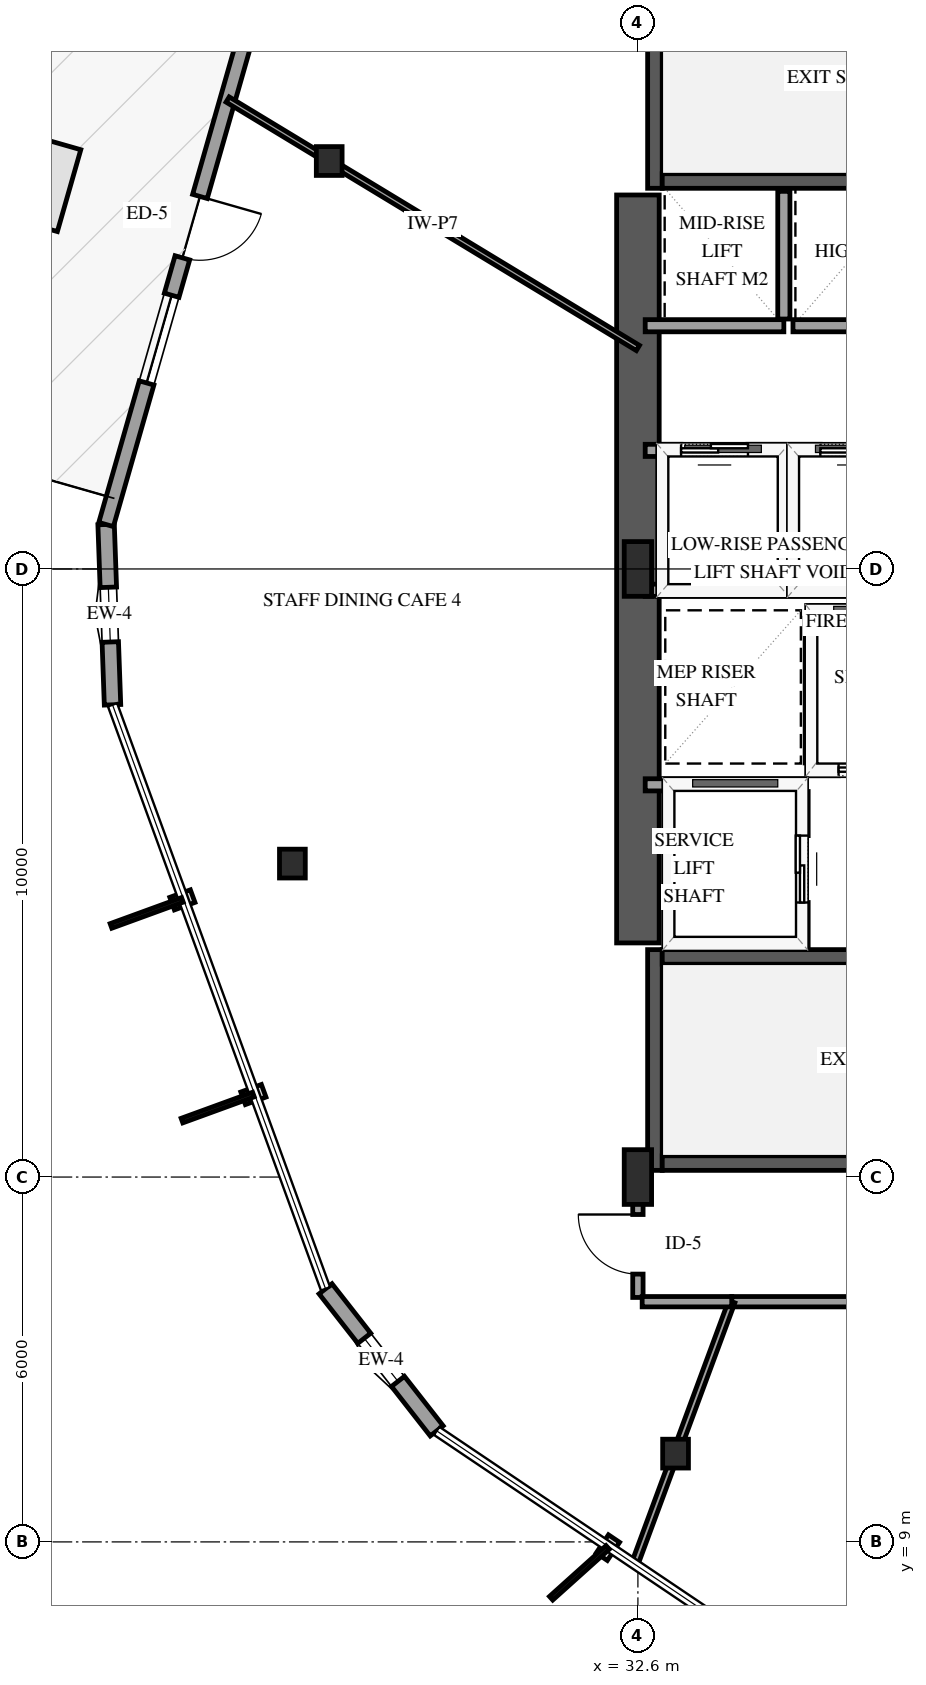
"""IFC4 building model, lengths in metres.
Left out: names, types, materials, properties, quantities, classifications, styles, units other than length and angle.
Written with IfcOpenShell. Run it as: python <this file> out.ifc"""

import sys

from ifc_helpers import new_model, si_unit, direction, frame, frame_2d, origin, origin_2d, place, context, subcontext, project, spatial, rectangle, i_section, extrude, element, fill, save


model = new_model("IFC4")
c1 = context("Model", 3, precision=1e-05, world=origin(), true_north=direction((0.0, 1.0)))
c2 = subcontext(c1, "Body", "Model", "MODEL_VIEW")
j1 = project(units=[si_unit("LENGTHUNIT", "METRE"), si_unit("PLANEANGLEUNIT", "RADIAN")], contexts=[c1])
p1 = place(None, origin())
s1 = spatial("IfcSite", under=j1, at=p1, CompositionType="ELEMENT")
p2 = place(p1, origin())
s2 = spatial("IfcBuilding", under=s1, at=p2, CompositionType="ELEMENT")
p3 = place(p2, frame((0.0, 0.0, 34.6)))
s3 = spatial("IfcBuildingStorey", under=s2, at=p3, CompositionType="ELEMENT", Elevation=34.6)
p4 = place(p3, frame((32.88, 15.11, 0.0), z_axis=(0.0, 0.0, 1.0), x_axis=(0.0, 1.0, 0.0)))
e1 = element("IfcWall", 1, at=p4, inside=s3, PredefinedType="SHEAR", context=c2, shape_type="SweptSolid", body=[
    extrude(rectangle(XDim=3.63, YDim=0.24, at=frame_2d((1.815, 0.0))), origin(), (0.0, 0.0, 1.0), 4.0),
])
for number, where, z_axis, x_axis in (
    (2, (33.0, 15.23, 0.0), (0.0, 0.0, 1.0), (1.0, 0.0, 0.0)),
    (3, (33.0, 18.62, 0.0), (0.0, 0.0, 1.0), (1.0, 0.0, 0.0)),
):
    element("IfcWall", number, at=place(p3, frame(where, z_axis=z_axis, x_axis=x_axis)), inside=s3, PredefinedType="SHEAR", context=c2, shape_type="SweptSolid", body=[
        extrude(rectangle(XDim=8.0, YDim=0.24, at=frame_2d((4.0, 0.0))), origin(), (0.0, 0.0, 1.0), 4.0),
    ])
p5 = place(p3, frame((32.88, 31.26, 0.0), z_axis=(0.0, 0.0, 1.0), x_axis=(0.0, 1.0, 0.0)))
e4 = element("IfcWall", 4, at=p5, inside=s3, PredefinedType="SHEAR", context=c2, shape_type="SweptSolid", body=[
    extrude(rectangle(XDim=3.63, YDim=0.24, at=frame_2d((1.815, 0.0))), origin(), (0.0, 0.0, 1.0), 4.0),
])
p6 = place(p3, frame((33.0, 31.38, 0.0), z_axis=(0.0, 0.0, 1.0), x_axis=(1.0, 0.0, 0.0)))
e5 = element("IfcWall", 5, at=p6, inside=s3, PredefinedType="SHEAR", context=c2, shape_type="SweptSolid", body=[
    extrude(rectangle(XDim=8.0, YDim=0.24, at=frame_2d((4.0, 0.0))), origin(), (0.0, 0.0, 1.0), 4.0),
])
p7 = place(p3, frame((32.6, 18.85, 0.0), z_axis=(0.0, 0.0, 1.0), x_axis=(0.0, 1.0, 0.0)))
e6 = element("IfcWall", 6, at=p7, inside=s3, PredefinedType="SHEAR", context=c2, shape_type="SweptSolid", body=[
    extrude(rectangle(XDim=12.3, YDim=0.7, at=frame_2d((6.15, 0.0))), origin(), (0.0, 0.0, 1.0), 4.0),
])
for number, where, z_axis, x_axis in (
    (7, (32.6, 15.0, 0.0), (0.0, 0.0, 1.0), (1.0, 0.0, 0.0)),
    (8, (32.6, 25.0, 0.0), (0.0, 0.0, 1.0), (1.0, 0.0, 0.0)),
):
    element("IfcColumn", number, at=place(p3, frame(where, z_axis=z_axis, x_axis=x_axis)), inside=s3, PredefinedType="PILASTER", context=c2, shape_type="SweptSolid", body=[
        extrude(rectangle(XDim=0.45, YDim=0.9, at=origin_2d()), origin(), (0.0, 0.0, 1.0), 4.0),
    ])
for number, where, z_axis, x_axis in (
    (9, (27.523, 31.708, 0.0), (0.0, 0.0, 1.0), (1.0, 0.0, 0.0)),
    (10, (26.918, 20.155, 0.0), (0.0, 0.0, 1.0), (1.0, 0.0, 0.0)),
    (11, (33.219, 10.452, 0.0), (0.0, 0.0, 1.0), (1.0, 0.0, 0.0)),
):
    element("IfcColumn", number, at=place(p3, frame(where, z_axis=z_axis, x_axis=x_axis)), inside=s3, PredefinedType="COLUMN", context=c2, shape_type="SweptSolid", body=[
        extrude(i_section(OverallWidth=0.424, OverallDepth=0.474, WebThickness=0.048, FlangeThickness=0.077, FilletRadius=0.038, at=origin_2d()), origin(), (0.0, 0.0, 1.0), 4.0),
    ])
p8 = place(p3, frame((23.854, 25.731, 0.0), z_axis=(0.0, 0.0, 1.0), x_axis=(0.035635755397, -0.999364844758, 0.0)))
e12 = element("IfcWall", 12, at=p8, inside=s3, PredefinedType="SOLIDWALL", context=c2, shape_type="SweptSolid", body=[
    extrude(rectangle(XDim=2.967, YDim=0.27, at=frame_2d((1.483, 0.0))), origin(), (0.0, 0.0, 1.0), 3.079),
])
p9 = place(p8, frame((1.033, 0.0, 0.75)))
e13 = element("IfcOpeningElement", 13, at=p9, cuts=e12, PredefinedType="OPENING", context=c2, shape_type="SweptSolid", body=[
    extrude(rectangle(XDim=0.9, YDim=1.5, at=frame_2d((0.45, 0.75))), frame((0.0, 0.145, 0.0), z_axis=(0.0, -1.0, 0.0), x_axis=(1.0, 0.0, 0.0)), (0.0, 0.0, 1.0), 0.29),
])
p10 = place(p3, frame((26.665, 35.56, 0.0), z_axis=(0.0, 0.0, 1.0), x_axis=(-0.274967139431, -0.961453624588, 0.0)))
e14 = element("IfcWall", 14, at=p10, inside=s3, PredefinedType="SOLIDWALL", context=c2, shape_type="SweptSolid", body=[
    extrude(rectangle(XDim=10.223, YDim=0.25, at=frame_2d((5.112, 0.0))), origin(), (0.0, 0.0, 1.0), 3.079),
])
p11 = place(p10, frame((4.612, 0.0, 0.0)))
e15 = element("IfcOpeningElement", 15, at=p11, cuts=e14, PredefinedType="OPENING", context=c2, shape_type="SweptSolid", body=[
    extrude(rectangle(XDim=1.05, YDim=2.15, at=frame_2d((0.525, 1.075))), frame((0.0, 0.135, 0.0), z_axis=(0.0, -1.0, 0.0), x_axis=(1.0, 0.0, 0.0)), (0.0, 0.0, 1.0), 0.27),
])
p12 = place(p10, frame((0.44, 0.0, 0.72)))
e16 = element("IfcOpeningElement", 16, at=p12, cuts=e14, PredefinedType="OPENING", context=c2, shape_type="SweptSolid", body=[
    extrude(rectangle(XDim=1.5, YDim=1.7, at=frame_2d((0.75, 0.85))), frame((0.0, 0.135, 0.0), z_axis=(0.0, -1.0, 0.0), x_axis=(1.0, 0.0, 0.0)), (0.0, 0.0, 1.0), 0.27),
])
p13 = place(p10, frame((6.302, 0.0, 0.72)))
e17 = element("IfcOpeningElement", 17, at=p13, cuts=e14, PredefinedType="OPENING", context=c2, shape_type="SweptSolid", body=[
    extrude(rectangle(XDim=1.5, YDim=1.7, at=frame_2d((0.75, 0.85))), frame((0.0, 0.135, 0.0), z_axis=(0.0, -1.0, 0.0), x_axis=(1.0, 0.0, 0.0)), (0.0, 0.0, 1.0), 0.27),
])
p14 = place(p3, frame((27.463, 13.162, 0.0), z_axis=(0.0, 0.0, 1.0), x_axis=(0.616177326297, -0.78760745461, 0.0)))
e18 = element("IfcWall", 18, at=p14, inside=s3, PredefinedType="SOLIDWALL", context=c2, shape_type="SweptSolid", body=[
    extrude(rectangle(XDim=2.967, YDim=0.27, at=frame_2d((1.483, 0.0))), origin(), (0.0, 0.0, 1.0), 3.079),
])
p15 = place(p14, frame((1.033, 0.0, 0.75)))
e19 = element("IfcOpeningElement", 19, at=p15, cuts=e18, PredefinedType="OPENING", context=c2, shape_type="SweptSolid", body=[
    extrude(rectangle(XDim=0.9, YDim=1.5, at=frame_2d((0.45, 0.75))), frame((0.0, 0.145, 0.0), z_axis=(0.0, -1.0, 0.0), x_axis=(1.0, 0.0, 0.0)), (0.0, 0.0, 1.0), 0.29),
])
p16 = place(p3, frame((35.45, 21.7, 0.0), z_axis=(0.0, 0.0, 1.0), x_axis=(1.0, 0.0, 0.0)))
e20 = element("IfcWall", 20, at=p16, inside=s3, PredefinedType="SOLIDWALL", context=c2, shape_type="SweptSolid", body=[
    extrude(rectangle(XDim=2.0, YDim=0.2, at=frame_2d((1.0, 0.0))), origin(), (0.0, 0.0, 1.0), 3.7),
])
p17 = place(p16, frame((0.45, 0.0, 0.0)))
e21 = element("IfcOpeningElement", 21, at=p17, cuts=e20, PredefinedType="OPENING", context=c2, shape_type="SweptSolid", body=[
    extrude(rectangle(XDim=1.1, YDim=2.15, at=frame_2d((0.55, 1.075))), frame((0.0, 0.11, 0.0), z_axis=(0.0, -1.0, 0.0), x_axis=(1.0, 0.0, 0.0)), (0.0, 0.0, 1.0), 0.22),
])
p18 = place(p3, frame((35.45, 24.3, 0.0), z_axis=(0.0, 0.0, 1.0), x_axis=(1.0, 0.0, 0.0)))
e22 = element("IfcWall", 22, at=p18, inside=s3, PredefinedType="SOLIDWALL", context=c2, shape_type="SweptSolid", body=[
    extrude(rectangle(XDim=2.0, YDim=0.2, at=frame_2d((1.0, 0.0))), origin(), (0.0, 0.0, 1.0), 3.7),
])
p19 = place(p3, frame((35.45, 21.81, 0.0), z_axis=(0.0, 0.0, 1.0), x_axis=(0.0, 1.0, 0.0)))
e23 = element("IfcWall", 23, at=p19, inside=s3, PredefinedType="SOLIDWALL", context=c2, shape_type="SweptSolid", body=[
    extrude(rectangle(XDim=2.38, YDim=0.2, at=frame_2d((1.19, 0.0))), origin(), (0.0, 0.0, 1.0), 3.7),
])
p20 = place(p3, frame((32.72, 21.45, 0.0), z_axis=(0.0, 0.0, 1.0), x_axis=(1.0, 0.0, 0.0)))
e24 = element("IfcWall", 24, at=p20, inside=s3, PredefinedType="SOLIDWALL", context=c2, shape_type="SweptSolid", body=[
    extrude(rectangle(XDim=2.58, YDim=0.2, at=frame_2d((1.29, 0.0))), origin(), (0.0, 0.0, 1.0), 3.7),
])
p21 = place(p3, frame((35.3, 18.79, 0.0), z_axis=(0.0, 0.0, 1.0), x_axis=(0.0, 1.0, 0.0)))
e25 = element("IfcWall", 25, at=p21, inside=s3, PredefinedType="SOLIDWALL", context=c2, shape_type="SweptSolid", body=[
    extrude(rectangle(XDim=2.55, YDim=0.2, at=frame_2d((1.275, 0.0))), origin(), (0.0, 0.0, 1.0), 3.7),
])
p22 = place(p21, frame((0.725, 0.0, 0.0)))
e26 = element("IfcOpeningElement", 26, at=p22, cuts=e25, PredefinedType="OPENING", context=c2, shape_type="SweptSolid", body=[
    extrude(rectangle(XDim=1.1, YDim=2.15, at=frame_2d((0.55, 1.075))), frame((0.0, 0.11, 0.0), z_axis=(0.0, -1.0, 0.0), x_axis=(1.0, 0.0, 0.0)), (0.0, 0.0, 1.0), 0.22),
])
p23 = place(p3, frame((32.72, 24.65, 0.0), z_axis=(0.0, 0.0, 1.0), x_axis=(1.0, 0.0, 0.0)))
e27 = element("IfcWall", 27, at=p23, inside=s3, PredefinedType="SOLIDWALL", context=c2, shape_type="SweptSolid", body=[
    extrude(rectangle(XDim=2.28, YDim=0.2, at=frame_2d((1.14, 0.0))), origin(), (0.0, 0.0, 1.0), 3.7),
])
p24 = place(p3, frame((32.72, 26.95, 0.0), z_axis=(0.0, 0.0, 1.0), x_axis=(1.0, 0.0, 0.0)))
e28 = element("IfcWall", 28, at=p24, inside=s3, PredefinedType="SOLIDWALL", context=c2, shape_type="SweptSolid", body=[
    extrude(rectangle(XDim=2.28, YDim=0.2, at=frame_2d((1.14, 0.0))), origin(), (0.0, 0.0, 1.0), 3.7),
])
p25 = place(p24, frame((0.59, 0.0, 0.0)))
e29 = element("IfcOpeningElement", 29, at=p25, cuts=e28, PredefinedType="OPENING", context=c2, shape_type="SweptSolid", body=[
    extrude(rectangle(XDim=1.1, YDim=2.15, at=frame_2d((0.55, 1.075))), frame((0.0, 0.11, 0.0), z_axis=(0.0, -1.0, 0.0), x_axis=(1.0, 0.0, 0.0)), (0.0, 0.0, 1.0), 0.22),
])
p26 = place(p3, frame((35.0, 24.76, 0.0), z_axis=(0.0, 0.0, 1.0), x_axis=(0.0, 1.0, 0.0)))
e30 = element("IfcWall", 30, at=p26, inside=s3, PredefinedType="SOLIDWALL", context=c2, shape_type="SweptSolid", body=[
    extrude(rectangle(XDim=2.08, YDim=0.2, at=frame_2d((1.04, 0.0))), origin(), (0.0, 0.0, 1.0), 3.7),
])
p27 = place(p3, frame((35.15, 24.65, 0.0), z_axis=(0.0, 0.0, 1.0), x_axis=(1.0, 0.0, 0.0)))
e31 = element("IfcWall", 31, at=p27, inside=s3, PredefinedType="SOLIDWALL", context=c2, shape_type="SweptSolid", body=[
    extrude(rectangle(XDim=2.0, YDim=0.2, at=frame_2d((1.0, 0.0))), origin(), (0.0, 0.0, 1.0), 3.7),
])
p28 = place(p3, frame((35.15, 26.95, 0.0), z_axis=(0.0, 0.0, 1.0), x_axis=(1.0, 0.0, 0.0)))
e32 = element("IfcWall", 32, at=p28, inside=s3, PredefinedType="SOLIDWALL", context=c2, shape_type="SweptSolid", body=[
    extrude(rectangle(XDim=2.0, YDim=0.2, at=frame_2d((1.0, 0.0))), origin(), (0.0, 0.0, 1.0), 3.7),
])
p29 = place(p28, frame((0.45, 0.0, 0.0)))
e33 = element("IfcOpeningElement", 33, at=p29, cuts=e32, PredefinedType="OPENING", context=c2, shape_type="SweptSolid", body=[
    extrude(rectangle(XDim=1.1, YDim=2.15, at=frame_2d((0.55, 1.075))), frame((0.0, 0.11, 0.0), z_axis=(0.0, -1.0, 0.0), x_axis=(1.0, 0.0, 0.0)), (0.0, 0.0, 1.0), 0.22),
])
p30 = place(p3, frame((32.72, 29.0, 0.0), z_axis=(0.0, 0.0, 1.0), x_axis=(1.0, 0.0, 0.0)))
e34 = element("IfcWall", 34, at=p30, inside=s3, PredefinedType="SOLIDWALL", context=c2, shape_type="SweptSolid", body=[
    extrude(rectangle(XDim=2.28, YDim=0.2, at=frame_2d((1.14, 0.0))), origin(), (0.0, 0.0, 1.0), 3.7),
])
p31 = place(p3, frame((35.0, 29.11, 0.0), z_axis=(0.0, 0.0, 1.0), x_axis=(0.0, 1.0, 0.0)))
e35 = element("IfcWall", 35, at=p31, inside=s3, PredefinedType="SOLIDWALL", context=c2, shape_type="SweptSolid", body=[
    extrude(rectangle(XDim=2.1, YDim=0.2, at=frame_2d((1.05, 0.0))), origin(), (0.0, 0.0, 1.0), 3.7),
])
p32 = place(p3, frame((35.15, 29.0, 0.0), z_axis=(0.0, 0.0, 1.0), x_axis=(1.0, 0.0, 0.0)))
e36 = element("IfcWall", 36, at=p32, inside=s3, PredefinedType="SOLIDWALL", context=c2, shape_type="SweptSolid", body=[
    extrude(rectangle(XDim=2.0, YDim=0.2, at=frame_2d((1.0, 0.0))), origin(), (0.0, 0.0, 1.0), 3.7),
])
p33 = place(p3, frame((42.094, 12.95, 0.0), z_axis=(0.0, 0.0, 1.0), x_axis=(-1.0, 0.0, 0.0)))
e37 = element("IfcWall", 37, at=p33, inside=s3, PredefinedType="PARTITIONING", context=c2, shape_type="SweptSolid", body=[
    extrude(rectangle(XDim=7.951, YDim=0.17, at=frame_2d((3.976, 0.0))), origin(), (0.0, 0.0, 1.0), 3.7),
])
p34 = place(p33, frame((3.501, 0.0, 0.0)))
e38 = element("IfcOpeningElement", 38, at=p34, cuts=e37, PredefinedType="OPENING", context=c2, shape_type="SweptSolid", body=[
    extrude(rectangle(XDim=0.98, YDim=2.15, at=frame_2d((0.49, 1.075))), frame((0.0, 0.095, 0.0), z_axis=(0.0, -1.0, 0.0), x_axis=(1.0, 0.0, 0.0)), (0.0, 0.0, 1.0), 0.19),
])
p35 = place(p3, frame((32.6, 28.634, 0.0), z_axis=(0.0, 0.0, 1.0), x_axis=(-0.855377378264, 0.518005348191, 0.0)))
e39 = element("IfcWall", 39, at=p35, inside=s3, PredefinedType="PARTITIONING", context=c2, shape_type="SweptSolid", body=[
    extrude(rectangle(XDim=7.888, YDim=0.1, at=frame_2d((3.944, 0.0))), origin(), (0.0, 0.0, 1.0), 3.074),
])
p36 = place(p3, frame((34.143, 12.95, 0.0), z_axis=(0.0, 0.0, 1.0), x_axis=(-0.347062077262, -0.937842158642, 0.0)))
e40 = element("IfcWall", 40, at=p36, inside=s3, PredefinedType="PARTITIONING", context=c2, shape_type="SweptSolid", body=[
    extrude(rectangle(XDim=4.602, YDim=0.11, at=frame_2d((2.301, 0.0))), origin(), (0.0, 0.0, 1.0), 2.995),
])
p37 = place(p3, frame((32.6, 13.02, 0.0), z_axis=(0.0, 0.0, 1.0), x_axis=(0.0, 1.0, 0.0)))
e41 = element("IfcWall", 41, at=p37, inside=s3, PredefinedType="PARTITIONING", context=c2, shape_type="SweptSolid", body=[
    extrude(rectangle(XDim=1.91, YDim=0.17, at=frame_2d((0.955, 0.0))), origin(), (0.0, 0.0, 1.0), 3.7),
])
p38 = place(p37, frame((0.384, 0.0, 0.0)))
e42 = element("IfcOpeningElement", 42, at=p38, cuts=e41, PredefinedType="OPENING", context=c2, shape_type="SweptSolid", body=[
    extrude(rectangle(XDim=0.98, YDim=2.15, at=frame_2d((0.49, 1.075))), frame((0.0, 0.095, 0.0), z_axis=(0.0, -1.0, 0.0), x_axis=(1.0, 0.0, 0.0)), (0.0, 0.0, 1.0), 0.19),
])
p39 = place(p3, frame((34.143, 12.95, 0.0), z_axis=(0.0, 0.0, 1.0), x_axis=(-1.0, 0.0, 0.0)))
e43 = element("IfcWall", 43, at=p39, inside=s3, PredefinedType="PARTITIONING", context=c2, shape_type="SweptSolid", body=[
    extrude(rectangle(XDim=1.473, YDim=0.17, at=frame_2d((0.737, 0.0))), origin(), (0.0, 0.0, 1.0), 3.7),
])
p40 = place(p9, origin())
e44 = element("IfcWindow", 44, at=p40, inside=s3, PartitioningType="SINGLE_PANEL", PredefinedType="WINDOW", context=c2, shape_type="SweptSolid", body=[
    extrude(rectangle(XDim=0.9, YDim=1.5, at=frame_2d((0.45, 0.75))), frame((0.0, 0.03, 0.0), z_axis=(0.0, -1.0, 0.0), x_axis=(1.0, 0.0, 0.0)), (0.0, 0.0, 1.0), 0.06),
])
fill(e13, e44)
p41 = place(p11, origin())
e45 = element("IfcDoor", 45, at=p41, inside=s3, OperationType="SINGLE_SWING_LEFT", PredefinedType="DOOR", context=c2, shape_type="SweptSolid", body=[
    extrude(rectangle(XDim=1.05, YDim=2.15, at=frame_2d((0.525, 1.075))), frame((0.0, 0.025, 0.0), z_axis=(0.0, -1.0, 0.0), x_axis=(1.0, 0.0, 0.0)), (0.0, 0.0, 1.0), 0.05),
])
fill(e15, e45)
p42 = place(p13, origin())
e46 = element("IfcWindow", 46, at=p42, inside=s3, PartitioningType="SINGLE_PANEL", PredefinedType="WINDOW", context=c2, shape_type="SweptSolid", body=[
    extrude(rectangle(XDim=1.5, YDim=1.7, at=frame_2d((0.75, 0.85))), frame((0.0, 0.03, 0.0), z_axis=(0.0, -1.0, 0.0), x_axis=(1.0, 0.0, 0.0)), (0.0, 0.0, 1.0), 0.06),
])
fill(e17, e46)
p43 = place(p15, origin())
e47 = element("IfcWindow", 47, at=p43, inside=s3, PartitioningType="SINGLE_PANEL", PredefinedType="WINDOW", context=c2, shape_type="SweptSolid", body=[
    extrude(rectangle(XDim=0.9, YDim=1.5, at=frame_2d((0.45, 0.75))), frame((0.0, 0.03, 0.0), z_axis=(0.0, -1.0, 0.0), x_axis=(1.0, 0.0, 0.0)), (0.0, 0.0, 1.0), 0.06),
])
fill(e19, e47)
p44 = place(p17, origin())
e48 = element("IfcDoor", 48, at=p44, inside=s3, OperationType="SLIDING_TO_LEFT", PredefinedType="DOOR", context=c2, shape_type="SweptSolid", body=[
    extrude(rectangle(XDim=1.1, YDim=2.15, at=frame_2d((0.55, 1.075))), frame((0.0, 0.025, 0.0), z_axis=(0.0, -1.0, 0.0), x_axis=(1.0, 0.0, 0.0)), (0.0, 0.0, 1.0), 0.05),
])
fill(e21, e48)
p45 = place(p22, origin())
e49 = element("IfcDoor", 49, at=p45, inside=s3, OperationType="SLIDING_TO_LEFT", PredefinedType="DOOR", context=c2, shape_type="SweptSolid", body=[
    extrude(rectangle(XDim=1.1, YDim=2.15, at=frame_2d((0.55, 1.075))), frame((0.0, 0.025, 0.0), z_axis=(0.0, -1.0, 0.0), x_axis=(1.0, 0.0, 0.0)), (0.0, 0.0, 1.0), 0.05),
])
fill(e26, e49)
p46 = place(p25, origin())
e50 = element("IfcDoor", 50, at=p46, inside=s3, OperationType="SLIDING_TO_LEFT", PredefinedType="DOOR", context=c2, shape_type="SweptSolid", body=[
    extrude(rectangle(XDim=1.1, YDim=2.15, at=frame_2d((0.55, 1.075))), frame((0.0, 0.025, 0.0), z_axis=(0.0, -1.0, 0.0), x_axis=(1.0, 0.0, 0.0)), (0.0, 0.0, 1.0), 0.05),
])
fill(e29, e50)
p47 = place(p29, origin())
e51 = element("IfcDoor", 51, at=p47, inside=s3, OperationType="SLIDING_TO_LEFT", PredefinedType="DOOR", context=c2, shape_type="SweptSolid", body=[
    extrude(rectangle(XDim=1.1, YDim=2.15, at=frame_2d((0.55, 1.075))), frame((0.0, 0.025, 0.0), z_axis=(0.0, -1.0, 0.0), x_axis=(1.0, 0.0, 0.0)), (0.0, 0.0, 1.0), 0.05),
])
fill(e33, e51)
p48 = place(p38, origin())
e52 = element("IfcDoor", 52, at=p48, inside=s3, OperationType="SINGLE_SWING_RIGHT", PredefinedType="DOOR", context=c2, shape_type="SweptSolid", body=[
    extrude(rectangle(XDim=0.98, YDim=2.15, at=frame_2d((0.49, 1.075))), frame((0.0, 0.025, 0.0), z_axis=(0.0, -1.0, 0.0), x_axis=(1.0, 0.0, 0.0)), (0.0, 0.0, 1.0), 0.05),
])
fill(e42, e52)
save(model, sys.argv[1])
